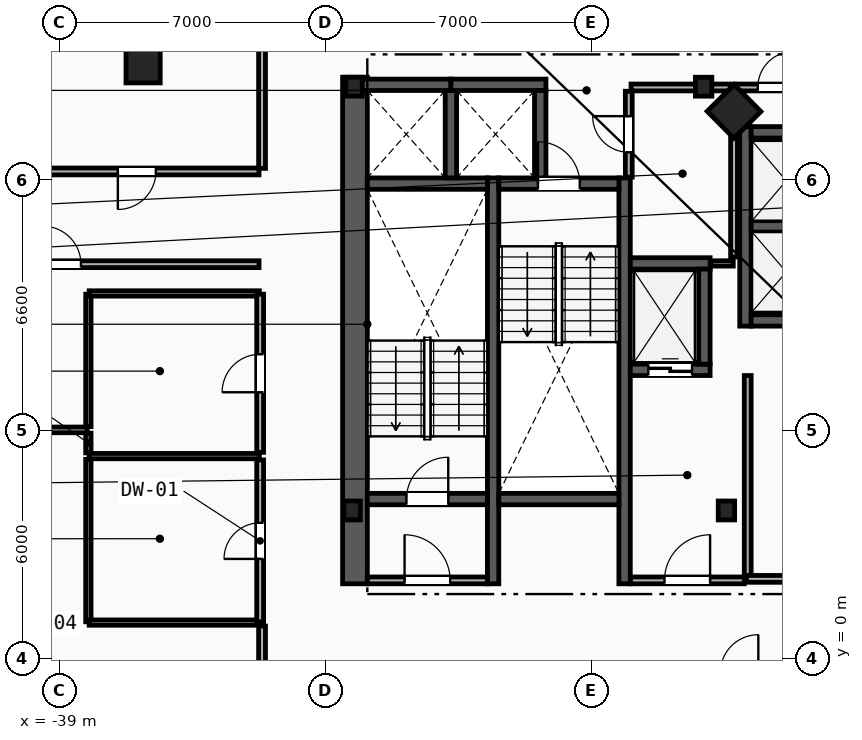
"""IFC4 building model, lengths in metres.
Left out: names, types, materials, properties, quantities, classifications, styles, units other than length and angle.
Written with IfcOpenShell. Run it as: python <this file> out.ifc"""

import sys

from ifc_helpers import new_model, si_unit, direction, frame, frame_2d, origin, origin_2d, place, context, subcontext, project, spatial, rectangle, i_section, extrude, element, fill, save


model = new_model("IFC4")
c1 = context("Model", 3, precision=1e-05, world=origin(), true_north=direction((0.0, 1.0)))
c2 = subcontext(c1, "Body", "Model", "MODEL_VIEW")
j1 = project(units=[si_unit("LENGTHUNIT", "METRE"), si_unit("PLANEANGLEUNIT", "RADIAN")], contexts=[c1])
p1 = place(None, origin())
s1 = spatial("IfcSite", under=j1, at=p1, CompositionType="ELEMENT")
p2 = place(p1, origin())
s2 = spatial("IfcBuilding", under=s1, at=p2, CompositionType="ELEMENT")
p3 = place(p2, frame((0.0, 0.0, 162.0)))
s3 = spatial("IfcBuildingStorey", under=s2, at=p3, CompositionType="ELEMENT", Elevation=162.0)
for number, where, z_axis, x_axis in (
    (1, (-31.3, 3.9, 0.0), (0.0, 0.0, 1.0), (1.0, 0.0, 0.0)),
    (2, (-21.45, 3.9, 0.0), (0.0, 0.0, 1.0), (1.0, 0.0, 0.0)),
    (3, (-22.05, 15.05, 0.0), (0.0, 0.0, 1.0), (1.0, 0.0, 0.0)),
    (4, (-31.25, 15.05, 0.0), (0.0, 0.0, 1.0), (1.0, 0.0, 0.0)),
):
    element("IfcColumn", number, at=place(p3, frame(where, z_axis=z_axis, x_axis=x_axis)), inside=s3, PredefinedType="COLUMN", context=c2, shape_type="SweptSolid", body=[
        extrude(i_section(OverallWidth=0.432, OverallDepth=0.498, WebThickness=0.056, FlangeThickness=0.089, FilletRadius=0.018, at=origin_2d()), origin(), (0.0, 0.0, 1.0), 3.6),
    ])
p4 = place(p3, frame((-36.8, 15.6, 0.0), z_axis=(0.0, 0.0, 1.0), x_axis=(1.0, 0.0, 0.0)))
e5 = element("IfcColumn", 5, at=p4, inside=s3, PredefinedType="COLUMN", context=c2, shape_type="SweptSolid", body=[
    extrude(rectangle(XDim=0.9, YDim=0.9, at=origin_2d()), origin(), (0.0, 0.0, 1.0), 3.6),
])
p5 = place(p3, frame((-21.25, 14.4, 0.0), z_axis=(0.0, 0.0, 1.0), x_axis=(-0.703270634186, 0.710922228581, 0.0)))
e6 = element("IfcColumn", 6, at=p5, inside=s3, PredefinedType="COLUMN", context=c2, shape_type="SweptSolid", body=[
    extrude(rectangle(XDim=1.0, YDim=1.0, at=origin_2d()), origin(), (0.0, 0.0, 1.0), 3.6),
])
p6 = place(p3, frame((-31.225, 1.97, 0.0), z_axis=(0.0, 0.0, 1.0), x_axis=(0.0, 1.0, 0.0)))
e7 = element("IfcWall", 7, at=p6, inside=s3, PredefinedType="SHEAR", context=c2, shape_type="SweptSolid", body=[
    extrude(rectangle(XDim=13.33, YDim=0.65, at=frame_2d((6.665, 0.0))), origin(), (0.0, 0.0, 1.0), 3.36),
])
for number, where, z_axis, x_axis in (
    (8, (-27.59, 1.97, 0.0), (0.0, 0.0, 1.0), (0.0, 1.0, 0.0)),
    (9, (-24.13, 1.97, 0.0), (0.0, 0.0, 1.0), (0.0, 1.0, 0.0)),
):
    element("IfcWall", number, at=place(p3, frame(where, z_axis=z_axis, x_axis=x_axis)), inside=s3, PredefinedType="SHEAR", context=c2, shape_type="SweptSolid", body=[
        extrude(rectangle(XDim=10.68, YDim=0.3, at=frame_2d((5.34, 0.0))), origin(), (0.0, 0.0, 1.0), 3.36),
    ])
p7 = place(p3, frame((-30.9, 4.2, 0.0), z_axis=(0.0, 0.0, 1.0), x_axis=(1.0, 0.0, 0.0)))
e10 = element("IfcWall", 10, at=p7, inside=s3, PredefinedType="SHEAR", context=c2, shape_type="SweptSolid", body=[
    extrude(rectangle(XDim=3.16, YDim=0.3, at=frame_2d((1.58, 0.0))), origin(), (0.0, 0.0, 1.0), 3.36),
])
p8 = place(p7, frame((1.03, 0.0, 0.0)))
e11 = element("IfcOpeningElement", 11, at=p8, cuts=e10, PredefinedType="OPENING", context=c2, shape_type="SweptSolid", body=[
    extrude(rectangle(XDim=1.1, YDim=2.15, at=frame_2d((0.55, 1.075))), frame((0.0, 0.16, 0.0), z_axis=(0.0, -1.0, 0.0), x_axis=(1.0, 0.0, 0.0)), (0.0, 0.0, 1.0), 0.32),
])
p9 = place(p3, frame((-30.9, 12.5, 0.0), z_axis=(0.0, 0.0, 1.0), x_axis=(1.0, 0.0, 0.0)))
e12 = element("IfcWall", 12, at=p9, inside=s3, PredefinedType="SHEAR", context=c2, shape_type="SweptSolid", body=[
    extrude(rectangle(XDim=3.16, YDim=0.3, at=frame_2d((1.58, 0.0))), origin(), (0.0, 0.0, 1.0), 3.36),
])
p10 = place(p3, frame((-27.44, 12.5, 0.0), z_axis=(0.0, 0.0, 1.0), x_axis=(1.0, 0.0, 0.0)))
e13 = element("IfcWall", 13, at=p10, inside=s3, PredefinedType="SHEAR", context=c2, shape_type="SweptSolid", body=[
    extrude(rectangle(XDim=3.16, YDim=0.3, at=frame_2d((1.58, 0.0))), origin(), (0.0, 0.0, 1.0), 3.36),
])
p11 = place(p10, frame((1.03, 0.0, 0.0)))
e14 = element("IfcOpeningElement", 14, at=p11, cuts=e13, PredefinedType="OPENING", context=c2, shape_type="SweptSolid", body=[
    extrude(rectangle(XDim=1.1, YDim=2.15, at=frame_2d((0.55, 1.075))), frame((0.0, 0.16, 0.0), z_axis=(0.0, -1.0, 0.0), x_axis=(1.0, 0.0, 0.0)), (0.0, 0.0, 1.0), 0.32),
])
p12 = place(p3, frame((-27.44, 4.2, 0.0), z_axis=(0.0, 0.0, 1.0), x_axis=(1.0, 0.0, 0.0)))
e15 = element("IfcWall", 15, at=p12, inside=s3, PredefinedType="SHEAR", context=c2, shape_type="SweptSolid", body=[
    extrude(rectangle(XDim=3.16, YDim=0.3, at=frame_2d((1.58, 0.0))), origin(), (0.0, 0.0, 1.0), 3.36),
])
p13 = place(p3, frame((-20.89, 2.15, 0.0), z_axis=(0.0, 0.0, 1.0), x_axis=(0.0, 1.0, 0.0)))
e16 = element("IfcWall", 16, at=p13, inside=s3, PredefinedType="PARTITIONING", context=c2, shape_type="SweptSolid", body=[
    extrude(rectangle(XDim=5.3, YDim=0.18, at=frame_2d((2.65, 0.0))), origin(), (0.0, 0.0, 1.0), 3.36),
])
p14 = place(p3, frame((-23.98, 2.06, 0.0), z_axis=(0.0, 0.0, 1.0), x_axis=(1.0, 0.0, 0.0)))
e17 = element("IfcWall", 17, at=p14, inside=s3, PredefinedType="PARTITIONING", context=c2, shape_type="SweptSolid", body=[
    extrude(rectangle(XDim=3.0, YDim=0.18, at=frame_2d((1.5, 0.0))), origin(), (0.0, 0.0, 1.0), 3.36),
])
p15 = place(p14, frame((0.9, 0.0, 0.0)))
e18 = element("IfcOpeningElement", 18, at=p15, cuts=e17, PredefinedType="OPENING", context=c2, shape_type="SweptSolid", body=[
    extrude(rectangle(XDim=1.2, YDim=2.15, at=frame_2d((0.6, 1.075))), frame((0.0, 0.1, 0.0), z_axis=(0.0, -1.0, 0.0), x_axis=(1.0, 0.0, 0.0)), (0.0, 0.0, 1.0), 0.2),
])
p16 = place(p3, frame((-30.9, 2.06, 0.0), z_axis=(0.0, 0.0, 1.0), x_axis=(1.0, 0.0, 0.0)))
e19 = element("IfcWall", 19, at=p16, inside=s3, PredefinedType="PARTITIONING", context=c2, shape_type="SweptSolid", body=[
    extrude(rectangle(XDim=3.16, YDim=0.18, at=frame_2d((1.58, 0.0))), origin(), (0.0, 0.0, 1.0), 3.36),
])
p17 = place(p16, frame((0.98, 0.0, 0.0)))
e20 = element("IfcOpeningElement", 20, at=p17, cuts=e19, PredefinedType="OPENING", context=c2, shape_type="SweptSolid", body=[
    extrude(rectangle(XDim=1.2, YDim=2.15, at=frame_2d((0.6, 1.075))), frame((0.0, 0.1, 0.0), z_axis=(0.0, -1.0, 0.0), x_axis=(1.0, 0.0, 0.0)), (0.0, 0.0, 1.0), 0.2),
])
p18 = place(p3, frame((-23.98, 7.6, 0.0), z_axis=(0.0, 0.0, 1.0), x_axis=(1.0, 0.0, 0.0)))
e21 = element("IfcWall", 21, at=p18, inside=s3, PredefinedType="SHEAR", context=c2, shape_type="SweptSolid", body=[
    extrude(rectangle(XDim=2.1, YDim=0.3, at=frame_2d((1.05, 0.0))), origin(), (0.0, 0.0, 1.0), 3.36),
])
p19 = place(p18, frame((0.475, 0.0, 0.0)))
e22 = element("IfcOpeningElement", 22, at=p19, cuts=e21, PredefinedType="OPENING", context=c2, shape_type="SweptSolid", body=[
    extrude(rectangle(XDim=1.15, YDim=2.2, at=frame_2d((0.575, 1.1))), frame((0.0, 0.16, 0.0), z_axis=(0.0, -1.0, 0.0), x_axis=(1.0, 0.0, 0.0)), (0.0, 0.0, 1.0), 0.32),
])
p20 = place(p3, frame((-23.98, 10.4, 0.0), z_axis=(0.0, 0.0, 1.0), x_axis=(1.0, 0.0, 0.0)))
e23 = element("IfcWall", 23, at=p20, inside=s3, PredefinedType="SHEAR", context=c2, shape_type="SweptSolid", body=[
    extrude(rectangle(XDim=2.1, YDim=0.3, at=frame_2d((1.05, 0.0))), origin(), (0.0, 0.0, 1.0), 3.36),
])
for number, where, z_axis, x_axis in (
    (24, (-22.03, 7.75, 0.0), (0.0, 0.0, 1.0), (0.0, 1.0, 0.0)),
    (25, (-31.2, 15.1, 0.0), (0.0, 0.0, 1.0), (1.0, 0.0, 0.0)),
):
    element("IfcWall", number, at=place(p3, frame(where, z_axis=z_axis, x_axis=x_axis)), inside=s3, PredefinedType="SHEAR", context=c2, shape_type="SweptSolid", body=[
        extrude(rectangle(XDim=2.5, YDim=0.3, at=frame_2d((1.25, 0.0))), origin(), (0.0, 0.0, 1.0), 3.36),
    ])
p21 = place(p3, frame((-28.7, 12.65, 0.0), z_axis=(0.0, 0.0, 1.0), x_axis=(0.0, 1.0, 0.0)))
e26 = element("IfcWall", 26, at=p21, inside=s3, PredefinedType="SHEAR", context=c2, shape_type="SweptSolid", body=[
    extrude(rectangle(XDim=2.3, YDim=0.3, at=frame_2d((1.15, 0.0))), origin(), (0.0, 0.0, 1.0), 3.36),
])
p22 = place(p3, frame((-28.7, 15.1, 0.0), z_axis=(0.0, 0.0, 1.0), x_axis=(1.0, 0.0, 0.0)))
e27 = element("IfcWall", 27, at=p22, inside=s3, PredefinedType="SHEAR", context=c2, shape_type="SweptSolid", body=[
    extrude(rectangle(XDim=2.5, YDim=0.3, at=frame_2d((1.25, 0.0))), origin(), (0.0, 0.0, 1.0), 3.36),
])
p23 = place(p3, frame((-26.35, 12.65, 0.0), z_axis=(0.0, 0.0, 1.0), x_axis=(0.0, 1.0, 0.0)))
e28 = element("IfcWall", 28, at=p23, inside=s3, PredefinedType="SHEAR", context=c2, shape_type="SweptSolid", body=[
    extrude(rectangle(XDim=2.3, YDim=0.3, at=frame_2d((1.15, 0.0))), origin(), (0.0, 0.0, 1.0), 3.36),
])
p24 = place(p3, frame((-20.95, 8.75, 0.0), z_axis=(0.0, 0.0, 1.0), x_axis=(0.0, 1.0, 0.0)))
e29 = element("IfcWall", 29, at=p24, inside=s3, PredefinedType="SHEAR", context=c2, shape_type="SweptSolid", body=[
    extrude(rectangle(XDim=5.25, YDim=0.3, at=frame_2d((2.625, 0.0))), origin(), (0.0, 0.0, 1.0), 3.36),
])
for number, where, z_axis, x_axis in (
    (30, (-20.8, 8.9, 0.0), (0.0, 0.0, 1.0), (1.0, 0.0, 0.0)),
    (31, (-20.8, 13.85, 0.0), (0.0, 0.0, 1.0), (1.0, 0.0, 0.0)),
):
    element("IfcWall", number, at=place(p3, frame(where, z_axis=z_axis, x_axis=x_axis)), inside=s3, PredefinedType="SHEAR", context=c2, shape_type="SweptSolid", body=[
        extrude(rectangle(XDim=2.15, YDim=0.3, at=frame_2d((1.075, 0.0))), origin(), (0.0, 0.0, 1.0), 3.36),
    ])
p25 = place(p3, frame((-20.8, 11.375, 0.0), z_axis=(0.0, 0.0, 1.0), x_axis=(1.0, 0.0, 0.0)))
e32 = element("IfcWall", 32, at=p25, inside=s3, PredefinedType="SHEAR", context=c2, shape_type="SweptSolid", body=[
    extrude(rectangle(XDim=1.85, YDim=0.3, at=frame_2d((0.925, 0.0))), origin(), (0.0, 0.0, 1.0), 3.36),
])
p26 = place(p3, frame((-21.23, 15.03, 0.0), z_axis=(0.0, 0.0, 1.0), x_axis=(1.0, 0.0, 0.0)))
e33 = element("IfcWall", 33, at=p26, inside=s3, PredefinedType="PARTITIONING", context=c2, shape_type="SweptSolid", body=[
    extrude(rectangle(XDim=2.16, YDim=0.18, at=frame_2d((1.08, 0.0))), origin(), (0.0, 0.0, 1.0), 3.36),
])
p27 = place(p26, frame((0.605, 0.0, 0.0)))
e34 = element("IfcOpeningElement", 34, at=p27, cuts=e33, PredefinedType="OPENING", context=c2, shape_type="SweptSolid", body=[
    extrude(rectangle(XDim=0.95, YDim=2.1, at=frame_2d((0.475, 1.05))), frame((0.0, 0.1, 0.0), z_axis=(0.0, -1.0, 0.0), x_axis=(1.0, 0.0, 0.0)), (0.0, 0.0, 1.0), 0.2),
])
p28 = place(p3, frame((-21.86, 10.4, 0.0), z_axis=(0.0, 0.0, 1.0), x_axis=(1.0, 0.0, 0.0)))
e35 = element("IfcWall", 35, at=p28, inside=s3, PredefinedType="PARTITIONING", context=c2, shape_type="SweptSolid", body=[
    extrude(rectangle(XDim=0.59, YDim=0.14, at=frame_2d((0.295, 0.0))), origin(), (0.0, 0.0, 1.0), 3.36),
])
p29 = place(p3, frame((-21.25, 10.57, 0.0), z_axis=(0.0, 0.0, 1.0), x_axis=(0.0, 1.0, 0.0)))
e36 = element("IfcWall", 36, at=p29, inside=s3, PredefinedType="PARTITIONING", context=c2, shape_type="SweptSolid", body=[
    extrude(rectangle(XDim=4.36, YDim=0.18, at=frame_2d((2.18, 0.0))), origin(), (0.0, 0.0, 1.0), 3.36),
])
p30 = place(p3, frame((-23.96, 15.03, 0.0), z_axis=(0.0, 0.0, 1.0), x_axis=(1.0, 0.0, 0.0)))
e37 = element("IfcWall", 37, at=p30, inside=s3, PredefinedType="PARTITIONING", context=c2, shape_type="SweptSolid", body=[
    extrude(rectangle(XDim=2.61, YDim=0.18, at=frame_2d((1.305, 0.0))), origin(), (0.0, 0.0, 1.0), 2.433),
])
p31 = place(p3, frame((-24.02, 12.67, 0.0), z_axis=(0.0, 0.0, 1.0), x_axis=(0.0, 1.0, 0.0)))
e38 = element("IfcWall", 38, at=p31, inside=s3, PredefinedType="PARTITIONING", context=c2, shape_type="SweptSolid", body=[
    extrude(rectangle(XDim=2.26, YDim=0.18, at=frame_2d((1.13, 0.0))), origin(), (0.0, 0.0, 1.0), 3.36),
])
p32 = place(p31, frame((0.655, 0.0, 0.0)))
e39 = element("IfcOpeningElement", 39, at=p32, cuts=e38, PredefinedType="OPENING", context=c2, shape_type="SweptSolid", body=[
    extrude(rectangle(XDim=0.95, YDim=2.1, at=frame_2d((0.475, 1.05))), frame((0.0, 0.1, 0.0), z_axis=(0.0, -1.0, 0.0), x_axis=(1.0, 0.0, 0.0)), (0.0, 0.0, 1.0), 0.2),
])
p33 = place(p3, frame((-38.24, 0.97, 0.0), z_axis=(0.0, 0.0, 1.0), x_axis=(0.0, 1.0, 0.0)))
e40 = element("IfcWall", 40, at=p33, inside=s3, PredefinedType="PARTITIONING", context=c2, shape_type="SweptSolid", body=[
    extrude(rectangle(XDim=4.275, YDim=0.14, at=frame_2d((2.138, 0.0))), origin(), (0.0, 0.0, 1.0), 3.36),
])
p34 = place(p3, frame((-38.24, 5.415, 0.0), z_axis=(0.0, 0.0, 1.0), x_axis=(0.0, 1.0, 0.0)))
e41 = element("IfcWall", 41, at=p34, inside=s3, PredefinedType="PARTITIONING", context=c2, shape_type="SweptSolid", body=[
    extrude(rectangle(XDim=0.52, YDim=0.14, at=frame_2d((0.26, 0.0))), origin(), (0.0, 0.0, 1.0), 3.36),
])
p35 = place(p3, frame((-38.24, 6.105, 0.0), z_axis=(0.0, 0.0, 1.0), x_axis=(0.0, 1.0, 0.0)))
e42 = element("IfcWall", 42, at=p35, inside=s3, PredefinedType="PARTITIONING", context=c2, shape_type="SweptSolid", body=[
    extrude(rectangle(XDim=3.485, YDim=0.14, at=frame_2d((1.743, 0.0))), origin(), (0.0, 0.0, 1.0), 3.36),
])
for number, where, z_axis, x_axis in (
    (43, (-38.22, 0.95, 0.0), (0.0, 0.0, 1.0), (1.0, 0.0, 0.0)),
    (44, (-38.22, 5.33, 0.0), (0.0, 0.0, 1.0), (1.0, 0.0, 0.0)),
    (45, (-38.22, 9.61, 0.0), (0.0, 0.0, 1.0), (1.0, 0.0, 0.0)),
):
    element("IfcWall", number, at=place(p3, frame(where, z_axis=z_axis, x_axis=x_axis)), inside=s3, PredefinedType="PARTITIONING", context=c2, shape_type="SweptSolid", body=[
        extrude(rectangle(XDim=4.48, YDim=0.14, at=frame_2d((2.24, 0.0))), origin(), (0.0, 0.0, 1.0), 3.36),
    ])
p36 = place(p3, frame((-33.72, 0.97, 0.0), z_axis=(0.0, 0.0, 1.0), x_axis=(0.0, 1.0, 0.0)))
e46 = element("IfcWall", 46, at=p36, inside=s3, PredefinedType="PARTITIONING", context=c2, shape_type="SweptSolid", body=[
    extrude(rectangle(XDim=4.26, YDim=0.18, at=frame_2d((2.13, 0.0))), origin(), (0.0, 0.0, 1.0), 3.36),
])
p37 = place(p36, frame((1.655, 0.0, 0.0)))
e47 = element("IfcOpeningElement", 47, at=p37, cuts=e46, PredefinedType="OPENING", context=c2, shape_type="SweptSolid", body=[
    extrude(rectangle(XDim=0.95, YDim=2.1, at=frame_2d((0.475, 1.05))), frame((0.0, 0.1, 0.0), z_axis=(0.0, -1.0, 0.0), x_axis=(1.0, 0.0, 0.0)), (0.0, 0.0, 1.0), 0.2),
])
p38 = place(p3, frame((-33.72, 5.43, 0.0), z_axis=(0.0, 0.0, 1.0), x_axis=(0.0, 1.0, 0.0)))
e48 = element("IfcWall", 48, at=p38, inside=s3, PredefinedType="PARTITIONING", context=c2, shape_type="SweptSolid", body=[
    extrude(rectangle(XDim=4.16, YDim=0.18, at=frame_2d((2.08, 0.0))), origin(), (0.0, 0.0, 1.0), 3.36),
])
p39 = place(p38, frame((1.58, 0.0, 0.0)))
e49 = element("IfcOpeningElement", 49, at=p39, cuts=e48, PredefinedType="OPENING", context=c2, shape_type="SweptSolid", body=[
    extrude(rectangle(XDim=1.0, YDim=2.15, at=frame_2d((0.5, 1.075))), frame((0.0, 0.1, 0.0), z_axis=(0.0, -1.0, 0.0), x_axis=(1.0, 0.0, 0.0)), (0.0, 0.0, 1.0), 0.2),
])
p40 = place(p3, frame((-50.641, 6.02, 0.0), z_axis=(0.0, 0.0, 1.0), x_axis=(1.0, 0.0, 0.0)))
e50 = element("IfcWall", 50, at=p40, inside=s3, PredefinedType="PARTITIONING", context=c2, shape_type="SweptSolid", body=[
    extrude(rectangle(XDim=12.371, YDim=0.15, at=frame_2d((6.186, 0.0))), origin(), (0.0, 0.0, 1.0), 3.36),
])
p41 = place(p3, frame((-33.67, 0.859, 0.0), z_axis=(0.0, 0.0, 1.0), x_axis=(0.0, -1.0, 0.0)))
e51 = element("IfcWall", 51, at=p41, inside=s3, PredefinedType="PARTITIONING", context=c2, shape_type="SweptSolid", body=[
    extrude(rectangle(XDim=1.187, YDim=0.18, at=frame_2d((0.594, 0.0))), origin(), (0.0, 0.0, 1.0), 3.36),
])
p42 = place(p3, frame((-16.822, 2.1, 0.0), z_axis=(0.0, 0.0, 1.0), x_axis=(-1.0, 0.0, 0.0)))
e52 = element("IfcWall", 52, at=p42, inside=s3, PredefinedType="PARTITIONING", context=c2, shape_type="SweptSolid", body=[
    extrude(rectangle(XDim=4.098, YDim=0.18, at=frame_2d((2.049, 0.0))), origin(), (0.0, 0.0, 1.0), 3.36),
])
p43 = place(p3, frame((-40.178, 10.38, 0.0), z_axis=(0.0, 0.0, 1.0), x_axis=(1.0, 0.0, 0.0)))
e53 = element("IfcWall", 53, at=p43, inside=s3, PredefinedType="PARTITIONING", context=c2, shape_type="SweptSolid", body=[
    extrude(rectangle(XDim=6.428, YDim=0.18, at=frame_2d((3.214, 0.0))), origin(), (0.0, 0.0, 1.0), 3.36),
])
p44 = place(p43, frame((0.743, 0.0, 0.0)))
e54 = element("IfcOpeningElement", 54, at=p44, cuts=e53, PredefinedType="OPENING", context=c2, shape_type="SweptSolid", body=[
    extrude(rectangle(XDim=1.0, YDim=2.15, at=frame_2d((0.5, 1.075))), frame((0.0, 0.1, 0.0), z_axis=(0.0, -1.0, 0.0), x_axis=(1.0, 0.0, 0.0)), (0.0, 0.0, 1.0), 0.2),
])
p45 = place(p3, frame((-33.75, 12.82, 0.0), z_axis=(0.0, 0.0, 1.0), x_axis=(-1.0, 0.0, 0.0)))
e55 = element("IfcWall", 55, at=p45, inside=s3, PredefinedType="PARTITIONING", context=c2, shape_type="SweptSolid", body=[
    extrude(rectangle(XDim=6.428, YDim=0.18, at=frame_2d((3.214, 0.0))), origin(), (0.0, 0.0, 1.0), 3.36),
])
p46 = place(p45, frame((2.714, 0.0, 0.0)))
e56 = element("IfcOpeningElement", 56, at=p46, cuts=e55, PredefinedType="OPENING", context=c2, shape_type="SweptSolid", body=[
    extrude(rectangle(XDim=1.0, YDim=2.15, at=frame_2d((0.5, 1.075))), frame((0.0, 0.1, 0.0), z_axis=(0.0, -1.0, 0.0), x_axis=(1.0, 0.0, 0.0)), (0.0, 0.0, 1.0), 0.2),
])
p47 = place(p3, frame((-33.67, 17.428, 0.0), z_axis=(0.0, 0.0, 1.0), x_axis=(0.0, -1.0, 0.0)))
e57 = element("IfcWall", 57, at=p47, inside=s3, PredefinedType="PARTITIONING", context=c2, shape_type="SweptSolid", body=[
    extrude(rectangle(XDim=4.529, YDim=0.18, at=frame_2d((2.264, 0.0))), origin(), (0.0, 0.0, 1.0), 3.36),
])
p48 = place(p8, origin())
e58 = element("IfcDoor", 58, at=p48, inside=s3, OperationType="SINGLE_SWING_RIGHT", PredefinedType="DOOR", context=c2, shape_type="SweptSolid", body=[
    extrude(rectangle(XDim=1.1, YDim=2.15, at=frame_2d((0.55, 1.075))), frame((0.0, 0.025, 0.0), z_axis=(0.0, -1.0, 0.0), x_axis=(1.0, 0.0, 0.0)), (0.0, 0.0, 1.0), 0.05),
])
fill(e11, e58)
p49 = place(p11, origin())
e59 = element("IfcDoor", 59, at=p49, inside=s3, OperationType="SINGLE_SWING_LEFT", PredefinedType="DOOR", context=c2, shape_type="SweptSolid", body=[
    extrude(rectangle(XDim=1.1, YDim=2.15, at=frame_2d((0.55, 1.075))), frame((0.0, 0.025, 0.0), z_axis=(0.0, -1.0, 0.0), x_axis=(1.0, 0.0, 0.0)), (0.0, 0.0, 1.0), 0.05),
])
fill(e14, e59)
p50 = place(p15, origin())
e60 = element("IfcDoor", 60, at=p50, inside=s3, OperationType="SINGLE_SWING_RIGHT", PredefinedType="DOOR", context=c2, shape_type="SweptSolid", body=[
    extrude(rectangle(XDim=1.2, YDim=2.15, at=frame_2d((0.6, 1.075))), frame((0.0, 0.025, 0.0), z_axis=(0.0, -1.0, 0.0), x_axis=(1.0, 0.0, 0.0)), (0.0, 0.0, 1.0), 0.05),
])
fill(e18, e60)
p51 = place(p17, origin())
e61 = element("IfcDoor", 61, at=p51, inside=s3, OperationType="SINGLE_SWING_LEFT", PredefinedType="DOOR", context=c2, shape_type="SweptSolid", body=[
    extrude(rectangle(XDim=1.2, YDim=2.15, at=frame_2d((0.6, 1.075))), frame((0.0, 0.025, 0.0), z_axis=(0.0, -1.0, 0.0), x_axis=(1.0, 0.0, 0.0)), (0.0, 0.0, 1.0), 0.05),
])
fill(e20, e61)
p52 = place(p19, origin())
e62 = element("IfcDoor", 62, at=p52, inside=s3, OperationType="SLIDING_TO_LEFT", PredefinedType="TRAPDOOR", context=c2, shape_type="SweptSolid", body=[
    extrude(rectangle(XDim=1.15, YDim=2.2, at=frame_2d((0.575, 1.1))), frame((0.0, 0.025, 0.0), z_axis=(0.0, -1.0, 0.0), x_axis=(1.0, 0.0, 0.0)), (0.0, 0.0, 1.0), 0.05),
])
fill(e22, e62)
p53 = place(p44, origin())
e63 = element("IfcDoor", 63, at=p53, inside=s3, OperationType="SINGLE_SWING_LEFT", PredefinedType="DOOR", context=c2, shape_type="SweptSolid", body=[
    extrude(rectangle(XDim=1.0, YDim=2.15, at=frame_2d((0.5, 1.075))), frame((0.0, 0.025, 0.0), z_axis=(0.0, -1.0, 0.0), x_axis=(1.0, 0.0, 0.0)), (0.0, 0.0, 1.0), 0.05),
])
fill(e54, e63)
p54 = place(p46, origin())
e64 = element("IfcDoor", 64, at=p54, inside=s3, OperationType="SINGLE_SWING_RIGHT", PredefinedType="DOOR", context=c2, shape_type="SweptSolid", body=[
    extrude(rectangle(XDim=1.0, YDim=2.15, at=frame_2d((0.5, 1.075))), frame((0.0, 0.025, 0.0), z_axis=(0.0, -1.0, 0.0), x_axis=(1.0, 0.0, 0.0)), (0.0, 0.0, 1.0), 0.05),
])
fill(e56, e64)
p55 = place(p37, origin())
e65 = element("IfcDoor", 65, at=p55, inside=s3, OperationType="SINGLE_SWING_LEFT", PredefinedType="DOOR", context=c2, shape_type="SweptSolid", body=[
    extrude(rectangle(XDim=0.95, YDim=2.1, at=frame_2d((0.475, 1.05))), frame((0.0, 0.025, 0.0), z_axis=(0.0, -1.0, 0.0), x_axis=(1.0, 0.0, 0.0)), (0.0, 0.0, 1.0), 0.05),
])
fill(e47, e65)
p56 = place(p39, origin())
e66 = element("IfcDoor", 66, at=p56, inside=s3, OperationType="SINGLE_SWING_LEFT", PredefinedType="DOOR", context=c2, shape_type="SweptSolid", body=[
    extrude(rectangle(XDim=1.0, YDim=2.15, at=frame_2d((0.5, 1.075))), frame((0.0, 0.025, 0.0), z_axis=(0.0, -1.0, 0.0), x_axis=(1.0, 0.0, 0.0)), (0.0, 0.0, 1.0), 0.05),
])
fill(e49, e66)
p57 = place(p32, origin())
e67 = element("IfcDoor", 67, at=p57, inside=s3, OperationType="SINGLE_SWING_RIGHT", PredefinedType="DOOR", context=c2, shape_type="SweptSolid", body=[
    extrude(rectangle(XDim=0.95, YDim=2.1, at=frame_2d((0.475, 1.05))), frame((0.0, 0.025, 0.0), z_axis=(0.0, -1.0, 0.0), x_axis=(1.0, 0.0, 0.0)), (0.0, 0.0, 1.0), 0.05),
])
fill(e39, e67)
p58 = place(p27, origin())
e68 = element("IfcDoor", 68, at=p58, inside=s3, OperationType="SINGLE_SWING_RIGHT", PredefinedType="DOOR", context=c2, shape_type="SweptSolid", body=[
    extrude(rectangle(XDim=0.95, YDim=2.1, at=frame_2d((0.475, 1.05))), frame((0.0, 0.025, 0.0), z_axis=(0.0, -1.0, 0.0), x_axis=(1.0, 0.0, 0.0)), (0.0, 0.0, 1.0), 0.05),
])
fill(e34, e68)
save(model, sys.argv[1])
